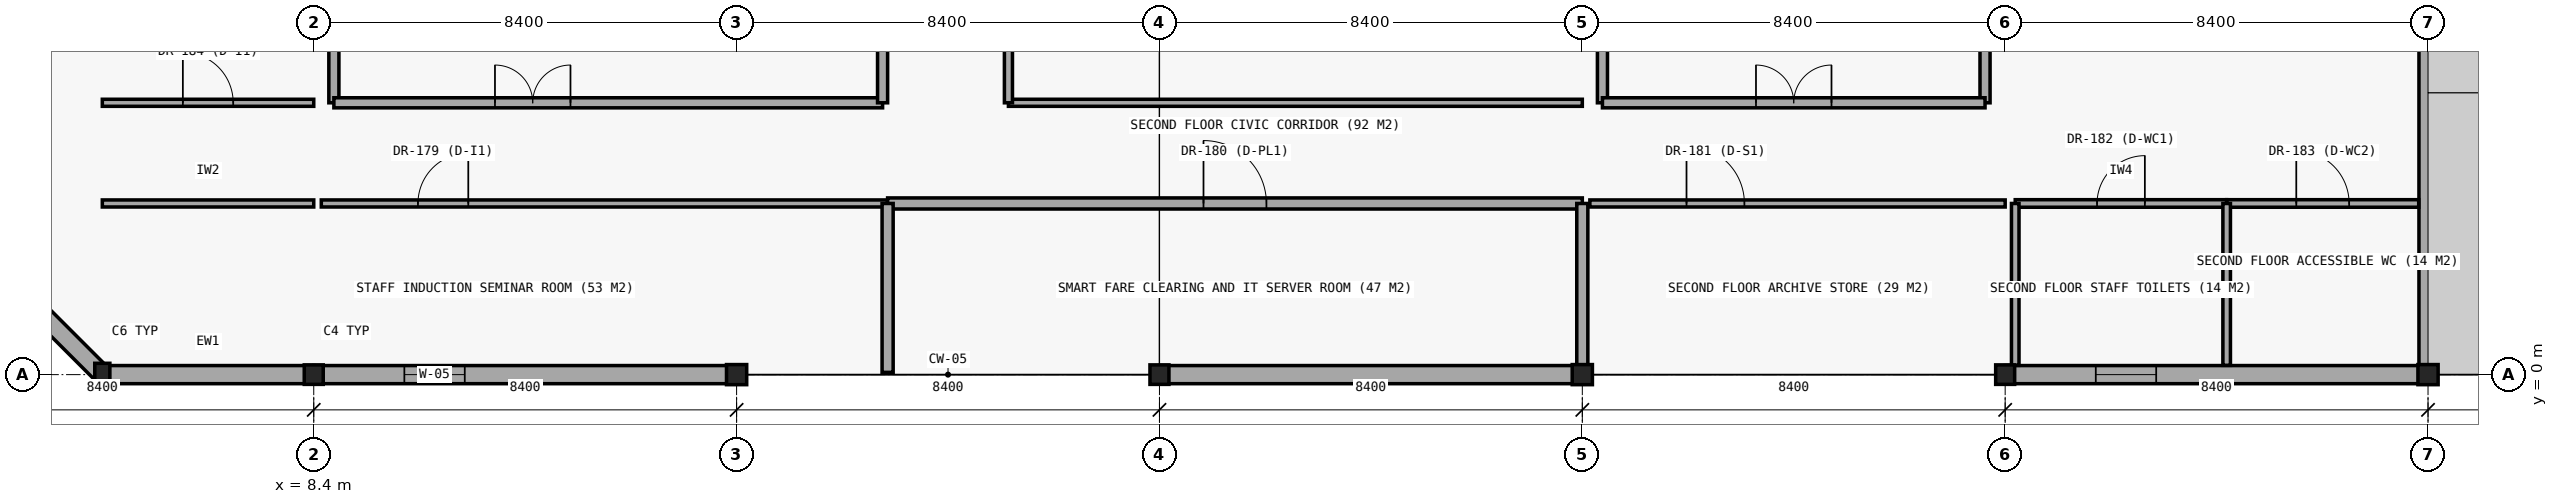
"""IFC4 building model, lengths in metres.
Left out: names, types, materials, properties, quantities, classifications, styles, units other than length and angle.
Written with IfcOpenShell. Run it as: python <this file> out.ifc"""

import sys

from ifc_helpers import new_model, si_unit, direction, frame, frame_2d, origin, origin_2d, place, context, subcontext, project, spatial, rectangle, i_section, extrude, element, fill, save


model = new_model("IFC4")
c1 = context("Model", 3, precision=1e-05, world=origin(), true_north=direction((0.0, 1.0)))
c2 = subcontext(c1, "Body", "Model", "MODEL_VIEW")
j1 = project(units=[si_unit("LENGTHUNIT", "METRE"), si_unit("PLANEANGLEUNIT", "RADIAN")], contexts=[c1])
p1 = place(None, origin())
s1 = spatial("IfcSite", under=j1, at=p1, CompositionType="ELEMENT")
p2 = place(p1, origin())
s2 = spatial("IfcBuilding", under=s1, at=p2, CompositionType="ELEMENT")
p3 = place(p2, frame((0.0, 0.0, 9.0)))
s3 = spatial("IfcBuildingStorey", under=s2, at=p3, CompositionType="ELEMENT", Elevation=9.0)
p4 = place(p3, frame((8.4, 0.0, 0.0), z_axis=(0.0, 0.0, 1.0), x_axis=(1.0, 0.0, 0.0)))
e1 = element("IfcColumn", 1, at=p4, inside=s3, PredefinedType="COLUMN", context=c2, shape_type="SweptSolid", body=[
    extrude(i_section(OverallWidth=0.377, OverallDepth=0.387, WebThickness=0.022, FlangeThickness=0.036, FilletRadius=0.015, at=origin_2d()), origin(), (0.0, 0.0, 1.0), 4.2),
])
p5 = place(p3, frame((16.8, 0.0, 0.0), z_axis=(0.0, 0.0, 1.0), x_axis=(1.0, 0.0, 0.0)))
e2 = element("IfcColumn", 2, at=p5, inside=s3, PredefinedType="COLUMN", context=c2, shape_type="SweptSolid", body=[
    extrude(i_section(OverallWidth=0.401, OverallDepth=0.399, WebThickness=0.025, FlangeThickness=0.04, FilletRadius=0.015, at=origin_2d()), origin(), (0.0, 0.0, 1.0), 4.2),
])
p6 = place(p3, frame((25.2, 0.0, 0.0), z_axis=(0.0, 0.0, 1.0), x_axis=(1.0, 0.0, 0.0)))
e3 = element("IfcColumn", 3, at=p6, inside=s3, PredefinedType="COLUMN", context=c2, shape_type="SweptSolid", body=[
    extrude(i_section(OverallWidth=0.377, OverallDepth=0.387, WebThickness=0.022, FlangeThickness=0.036, FilletRadius=0.015, at=origin_2d()), origin(), (0.0, 0.0, 1.0), 4.2),
])
p7 = place(p3, frame((33.6, 0.0, 0.0), z_axis=(0.0, 0.0, 1.0), x_axis=(1.0, 0.0, 0.0)))
e4 = element("IfcColumn", 4, at=p7, inside=s3, PredefinedType="COLUMN", context=c2, shape_type="SweptSolid", body=[
    extrude(i_section(OverallWidth=0.401, OverallDepth=0.399, WebThickness=0.025, FlangeThickness=0.04, FilletRadius=0.015, at=origin_2d()), origin(), (0.0, 0.0, 1.0), 4.2),
])
p8 = place(p3, frame((42.0, 0.0, 0.0), z_axis=(0.0, 0.0, 1.0), x_axis=(1.0, 0.0, 0.0)))
e5 = element("IfcColumn", 5, at=p8, inside=s3, PredefinedType="COLUMN", context=c2, shape_type="SweptSolid", body=[
    extrude(i_section(OverallWidth=0.377, OverallDepth=0.387, WebThickness=0.022, FlangeThickness=0.036, FilletRadius=0.015, at=origin_2d()), origin(), (0.0, 0.0, 1.0), 4.2),
])
p9 = place(p3, frame((50.4, 0.0, 0.0), z_axis=(0.0, 0.0, 1.0), x_axis=(1.0, 0.0, 0.0)))
e6 = element("IfcColumn", 6, at=p9, inside=s3, PredefinedType="COLUMN", context=c2, shape_type="SweptSolid", body=[
    extrude(i_section(OverallWidth=0.401, OverallDepth=0.399, WebThickness=0.025, FlangeThickness=0.04, FilletRadius=0.015, at=origin_2d()), origin(), (0.0, 0.0, 1.0), 4.2),
])
p10 = place(p3, frame((4.2, 0.0, 0.0), z_axis=(0.0, 0.0, 1.0), x_axis=(1.0, 0.0, 0.0)))
e7 = element("IfcColumn", 7, at=p10, inside=s3, PredefinedType="COLUMN", context=c2, shape_type="SweptSolid", body=[
    extrude(i_section(OverallWidth=0.3, OverallDepth=0.45, WebThickness=0.014, FlangeThickness=0.026, FilletRadius=0.027, at=origin_2d()), origin(), (0.0, 0.0, 1.0), 4.2),
])
p11 = place(p3, frame((4.2, 0.0, 0.0), z_axis=(0.0, 0.0, 1.0), x_axis=(1.0, 0.0, 0.0)))
e8 = element("IfcWall", 8, at=p11, inside=s3, PredefinedType="STANDARD", context=c2, shape_type="SweptSolid", body=[
    extrude(rectangle(XDim=4.2, YDim=0.36, at=frame_2d((2.1, 0.0))), origin(), (0.0, 0.0, 1.0), 3.62),
])
p12 = place(p3, frame((8.4, 0.0, 0.0), z_axis=(0.0, 0.0, 1.0), x_axis=(1.0, 0.0, 0.0)))
e9 = element("IfcWall", 9, at=p12, inside=s3, PredefinedType="STANDARD", context=c2, shape_type="SweptSolid", body=[
    extrude(rectangle(XDim=8.4, YDim=0.36, at=frame_2d((4.2, 0.0))), origin(), (0.0, 0.0, 1.0), 3.62),
])
p13 = place(p12, frame((1.8, 0.0, 0.85)))
e10 = element("IfcOpeningElement", 10, at=p13, cuts=e9, PredefinedType="OPENING", context=c2, shape_type="SweptSolid", body=[
    extrude(rectangle(XDim=1.2, YDim=2.4, at=frame_2d((0.6, 1.2))), frame((0.0, 0.19, 0.0), z_axis=(0.0, -1.0, 0.0), x_axis=(1.0, 0.0, 0.0)), (0.0, 0.0, 1.0), 0.38),
])
p14 = place(p3, frame((25.2, 0.0, 0.0), z_axis=(0.0, 0.0, 1.0), x_axis=(1.0, 0.0, 0.0)))
e11 = element("IfcWall", 11, at=p14, inside=s3, PredefinedType="STANDARD", context=c2, shape_type="SweptSolid", body=[
    extrude(rectangle(XDim=8.4, YDim=0.36, at=frame_2d((4.2, 0.0))), origin(), (0.0, 0.0, 1.0), 3.62),
])
p15 = place(p3, frame((42.0, 0.0, 0.0), z_axis=(0.0, 0.0, 1.0), x_axis=(1.0, 0.0, 0.0)))
e12 = element("IfcWall", 12, at=p15, inside=s3, PredefinedType="STANDARD", context=c2, shape_type="SweptSolid", body=[
    extrude(rectangle(XDim=8.4, YDim=0.36, at=frame_2d((4.2, 0.0))), origin(), (0.0, 0.0, 1.0), 3.62),
])
p16 = place(p15, frame((1.8, 0.0, 0.85)))
e13 = element("IfcOpeningElement", 13, at=p16, cuts=e12, PredefinedType="OPENING", context=c2, shape_type="SweptSolid", body=[
    extrude(rectangle(XDim=1.2, YDim=2.4, at=frame_2d((0.6, 1.2))), frame((0.0, 0.19, 0.0), z_axis=(0.0, -1.0, 0.0), x_axis=(1.0, 0.0, 0.0)), (0.0, 0.0, 1.0), 0.38),
])
p17 = place(p3, frame((50.4, 0.0, 0.0), z_axis=(0.0, 0.0, 1.0), x_axis=(0.0, 1.0, 0.0)))
e14 = element("IfcWall", 14, at=p17, inside=s3, PredefinedType="STANDARD", context=c2, shape_type="SweptSolid", body=[
    extrude(rectangle(XDim=8.4, YDim=0.36, at=frame_2d((4.2, 0.0))), origin(), (0.0, 0.0, 1.0), 3.62),
])
p18 = place(p3, frame((0.0, 4.2, 0.0), z_axis=(0.0, 0.0, 1.0), x_axis=(0.707106781187, -0.707106781187, 0.0)))
e15 = element("IfcWall", 15, at=p18, inside=s3, PredefinedType="STANDARD", context=c2, shape_type="SweptSolid", body=[
    extrude(rectangle(XDim=5.94, YDim=0.36, at=frame_2d((2.97, 0.0))), origin(), (0.0, 0.0, 1.0), 3.62),
])
p19 = place(p18, frame((2.5, 0.0, 1.0)))
e16 = element("IfcOpeningElement", 16, at=p19, cuts=e15, PredefinedType="OPENING", context=c2, shape_type="SweptSolid", body=[
    extrude(rectangle(XDim=0.85, YDim=1.8, at=frame_2d((0.425, 0.9))), frame((0.0, 0.19, 0.0), z_axis=(0.0, -1.0, 0.0), x_axis=(1.0, 0.0, 0.0)), (0.0, 0.0, 1.0), 0.38),
])
p20 = place(p3, frame((8.8, 5.4, 0.0), z_axis=(0.0, 0.0, 1.0), x_axis=(0.0, 1.0, 0.0)))
e17 = element("IfcWall", 17, at=p20, inside=s3, PredefinedType="PARTITIONING", context=c2, shape_type="SweptSolid", body=[
    extrude(rectangle(XDim=2.85, YDim=0.2, at=frame_2d((1.425, 0.0))), origin(), (0.0, 0.0, 1.0), 3.52),
])
p21 = place(p3, frame((8.8, 5.4, 0.0), z_axis=(0.0, 0.0, 1.0), x_axis=(1.0, 0.0, 0.0)))
e18 = element("IfcWall", 18, at=p21, inside=s3, PredefinedType="PARTITIONING", context=c2, shape_type="SweptSolid", body=[
    extrude(rectangle(XDim=10.9, YDim=0.2, at=frame_2d((5.45, 0.0))), origin(), (0.0, 0.0, 1.0), 3.52),
])
p22 = place(p21, frame((3.2, 0.0, 0.0)))
e19 = element("IfcOpeningElement", 19, at=p22, cuts=e18, PredefinedType="OPENING", context=c2, shape_type="SweptSolid", body=[
    extrude(rectangle(XDim=1.5, YDim=2.2, at=frame_2d((0.75, 1.1))), frame((0.0, 0.11, 0.0), z_axis=(0.0, -1.0, 0.0), x_axis=(1.0, 0.0, 0.0)), (0.0, 0.0, 1.0), 0.22),
])
p23 = place(p3, frame((19.7, 5.4, 0.0), z_axis=(0.0, 0.0, 1.0), x_axis=(0.0, 1.0, 0.0)))
e20 = element("IfcWall", 20, at=p23, inside=s3, PredefinedType="PARTITIONING", context=c2, shape_type="SweptSolid", body=[
    extrude(rectangle(XDim=9.6, YDim=0.2, at=frame_2d((4.8, 0.0))), origin(), (0.0, 0.0, 1.0), 3.52),
])
for number, where, z_axis, x_axis in (
    (21, (34.0, 5.4, 0.0), (0.0, 0.0, 1.0), (0.0, 1.0, 0.0)),
    (22, (41.6, 5.4, 0.0), (0.0, 0.0, 1.0), (0.0, 1.0, 0.0)),
):
    element("IfcWall", number, at=place(p3, frame(where, z_axis=z_axis, x_axis=x_axis)), inside=s3, PredefinedType="PARTITIONING", context=c2, shape_type="SweptSolid", body=[
        extrude(rectangle(XDim=2.85, YDim=0.2, at=frame_2d((1.425, 0.0))), origin(), (0.0, 0.0, 1.0), 3.49),
    ])
p24 = place(p3, frame((34.0, 5.4, 0.0), z_axis=(0.0, 0.0, 1.0), x_axis=(1.0, 0.0, 0.0)))
e23 = element("IfcWall", 23, at=p24, inside=s3, PredefinedType="PARTITIONING", context=c2, shape_type="SweptSolid", body=[
    extrude(rectangle(XDim=7.6, YDim=0.2, at=frame_2d((3.8, 0.0))), origin(), (0.0, 0.0, 1.0), 3.52),
])
p25 = place(p24, frame((3.05, 0.0, 0.0)))
e24 = element("IfcOpeningElement", 24, at=p25, cuts=e23, PredefinedType="OPENING", context=c2, shape_type="SweptSolid", body=[
    extrude(rectangle(XDim=1.5, YDim=2.2, at=frame_2d((0.75, 1.1))), frame((0.0, 0.11, 0.0), z_axis=(0.0, -1.0, 0.0), x_axis=(1.0, 0.0, 0.0)), (0.0, 0.0, 1.0), 0.22),
])
p26 = place(p3, frame((4.2, 3.4, 0.0), z_axis=(0.0, 0.0, 1.0), x_axis=(1.0, 0.0, 0.0)))
e25 = element("IfcWall", 25, at=p26, inside=s3, PredefinedType="PARTITIONING", context=c2, shape_type="SweptSolid", body=[
    extrude(rectangle(XDim=4.2, YDim=0.14, at=frame_2d((2.1, 0.0))), origin(), (0.0, 0.0, 1.0), 3.5),
])
p27 = place(p3, frame((8.55, 3.4, 0.0), z_axis=(0.0, 0.0, 1.0), x_axis=(1.0, 0.0, 0.0)))
e26 = element("IfcWall", 26, at=p27, inside=s3, PredefinedType="PARTITIONING", context=c2, shape_type="SweptSolid", body=[
    extrude(rectangle(XDim=11.25, YDim=0.14, at=frame_2d((5.625, 0.0))), origin(), (0.0, 0.0, 1.0), 3.5),
])
p28 = place(p27, frame((1.92, 0.0, 0.0)))
e27 = element("IfcOpeningElement", 27, at=p28, cuts=e26, PredefinedType="OPENING", context=c2, shape_type="SweptSolid", body=[
    extrude(rectangle(XDim=1.0, YDim=2.15, at=frame_2d((0.5, 1.075))), frame((0.0, 0.08, 0.0), z_axis=(0.0, -1.0, 0.0), x_axis=(1.0, 0.0, 0.0)), (0.0, 0.0, 1.0), 0.16),
])
p29 = place(p3, frame((19.8, 3.4, 0.0), z_axis=(0.0, 0.0, 1.0), x_axis=(1.0, 0.0, 0.0)))
e28 = element("IfcWall", 28, at=p29, inside=s3, PredefinedType="PARTITIONING", context=c2, shape_type="SweptSolid", body=[
    extrude(rectangle(XDim=13.8, YDim=0.22, at=frame_2d((6.9, 0.0))), origin(), (0.0, 0.0, 1.0), 3.5),
])
p30 = place(p29, frame((6.275, 0.0, 0.0)))
e29 = element("IfcOpeningElement", 29, at=p30, cuts=e28, PredefinedType="OPENING", context=c2, shape_type="SweptSolid", body=[
    extrude(rectangle(XDim=1.25, YDim=2.2, at=frame_2d((0.625, 1.1))), frame((0.0, 0.12, 0.0), z_axis=(0.0, -1.0, 0.0), x_axis=(1.0, 0.0, 0.0)), (0.0, 0.0, 1.0), 0.24),
])
p31 = place(p3, frame((33.75, 3.4, 0.0), z_axis=(0.0, 0.0, 1.0), x_axis=(1.0, 0.0, 0.0)))
e30 = element("IfcWall", 30, at=p31, inside=s3, PredefinedType="PARTITIONING", context=c2, shape_type="SweptSolid", body=[
    extrude(rectangle(XDim=8.25, YDim=0.14, at=frame_2d((4.125, 0.0))), origin(), (0.0, 0.0, 1.0), 3.5),
])
p32 = place(p31, frame((1.92, 0.0, 0.0)))
e31 = element("IfcOpeningElement", 31, at=p32, cuts=e30, PredefinedType="OPENING", context=c2, shape_type="SweptSolid", body=[
    extrude(rectangle(XDim=1.15, YDim=2.15, at=frame_2d((0.575, 1.075))), frame((0.0, 0.08, 0.0), z_axis=(0.0, -1.0, 0.0), x_axis=(1.0, 0.0, 0.0)), (0.0, 0.0, 1.0), 0.16),
])
p33 = place(p3, frame((42.2, 3.4, 0.0), z_axis=(0.0, 0.0, 1.0), x_axis=(1.0, 0.0, 0.0)))
e32 = element("IfcWall", 32, at=p33, inside=s3, PredefinedType="PARTITIONING", context=c2, shape_type="SweptSolid", body=[
    extrude(rectangle(XDim=4.2, YDim=0.15, at=frame_2d((2.1, 0.0))), origin(), (0.0, 0.0, 1.0), 3.5),
])
p34 = place(p33, frame((1.625, 0.0, 0.0)))
e33 = element("IfcOpeningElement", 33, at=p34, cuts=e32, PredefinedType="OPENING", context=c2, shape_type="SweptSolid", body=[
    extrude(rectangle(XDim=0.95, YDim=2.1, at=frame_2d((0.475, 1.05))), frame((0.0, 0.085, 0.0), z_axis=(0.0, -1.0, 0.0), x_axis=(1.0, 0.0, 0.0)), (0.0, 0.0, 1.0), 0.17),
])
p35 = place(p3, frame((46.4, 3.4, 0.0), z_axis=(0.0, 0.0, 1.0), x_axis=(1.0, 0.0, 0.0)))
e34 = element("IfcWall", 34, at=p35, inside=s3, PredefinedType="PARTITIONING", context=c2, shape_type="SweptSolid", body=[
    extrude(rectangle(XDim=3.815, YDim=0.15, at=frame_2d((1.908, 0.0))), origin(), (0.0, 0.0, 1.0), 3.5),
])
p36 = place(p35, frame((1.383, 0.0, 0.0)))
e35 = element("IfcOpeningElement", 35, at=p36, cuts=e34, PredefinedType="OPENING", context=c2, shape_type="SweptSolid", body=[
    extrude(rectangle(XDim=1.05, YDim=2.15, at=frame_2d((0.525, 1.075))), frame((0.0, 0.085, 0.0), z_axis=(0.0, -1.0, 0.0), x_axis=(1.0, 0.0, 0.0)), (0.0, 0.0, 1.0), 0.17),
])
p37 = place(p3, frame((4.2, 5.4, 0.0), z_axis=(0.0, 0.0, 1.0), x_axis=(1.0, 0.0, 0.0)))
e36 = element("IfcWall", 36, at=p37, inside=s3, PredefinedType="PARTITIONING", context=c2, shape_type="SweptSolid", body=[
    extrude(rectangle(XDim=4.2, YDim=0.14, at=frame_2d((2.1, 0.0))), origin(), (0.0, 0.0, 1.0), 3.5),
])
p38 = place(p37, frame((1.6, 0.0, 0.0)))
e37 = element("IfcOpeningElement", 37, at=p38, cuts=e36, PredefinedType="OPENING", context=c2, shape_type="SweptSolid", body=[
    extrude(rectangle(XDim=1.0, YDim=2.15, at=frame_2d((0.5, 1.075))), frame((0.0, 0.08, 0.0), z_axis=(0.0, -1.0, 0.0), x_axis=(1.0, 0.0, 0.0)), (0.0, 0.0, 1.0), 0.16),
])
p39 = place(p3, frame((22.2, 5.4, 0.0), z_axis=(0.0, 0.0, 1.0), x_axis=(1.0, 0.0, 0.0)))
e38 = element("IfcWall", 38, at=p39, inside=s3, PredefinedType="PARTITIONING", context=c2, shape_type="SweptSolid", body=[
    extrude(rectangle(XDim=11.4, YDim=0.14, at=frame_2d((5.7, 0.0))), origin(), (0.0, 0.0, 1.0), 3.5),
])
p40 = place(p3, frame((19.8, 0.045, 0.0), z_axis=(0.0, 0.0, 1.0), x_axis=(0.0, 1.0, 0.0)))
e39 = element("IfcWall", 39, at=p40, inside=s3, PredefinedType="PARTITIONING", context=c2, shape_type="SweptSolid", body=[
    extrude(rectangle(XDim=3.355, YDim=0.22, at=frame_2d((1.677, 0.0))), origin(), (0.0, 0.0, 1.0), 3.5),
])
p41 = place(p3, frame((22.2, 5.4, 0.0), z_axis=(0.0, 0.0, 1.0), x_axis=(0.0, 1.0, 0.0)))
e40 = element("IfcWall", 40, at=p41, inside=s3, PredefinedType="PARTITIONING", context=c2, shape_type="SweptSolid", body=[
    extrude(rectangle(XDim=16.6, YDim=0.16, at=frame_2d((8.3, 0.0))), origin(), (0.0, 0.0, 1.0), 3.5),
])
p42 = place(p41, frame((13.12, 0.0, 0.0)))
e41 = element("IfcOpeningElement", 41, at=p42, cuts=e40, PredefinedType="OPENING", context=c2, shape_type="SweptSolid", body=[
    extrude(rectangle(XDim=1.0, YDim=2.15, at=frame_2d((0.5, 1.075))), frame((0.0, 0.09, 0.0), z_axis=(0.0, -1.0, 0.0), x_axis=(1.0, 0.0, 0.0)), (0.0, 0.0, 1.0), 0.18),
])
p43 = place(p3, frame((33.6, 0.185, 0.0), z_axis=(0.0, 0.0, 1.0), x_axis=(0.0, 1.0, 0.0)))
e42 = element("IfcWall", 42, at=p43, inside=s3, PredefinedType="PARTITIONING", context=c2, shape_type="SweptSolid", body=[
    extrude(rectangle(XDim=3.215, YDim=0.22, at=frame_2d((1.607, 0.0))), origin(), (0.0, 0.0, 1.0), 3.49),
])
p44 = place(p3, frame((42.2, 0.185, 0.0), z_axis=(0.0, 0.0, 1.0), x_axis=(0.0, 1.0, 0.0)))
e43 = element("IfcWall", 43, at=p44, inside=s3, PredefinedType="PARTITIONING", context=c2, shape_type="SweptSolid", body=[
    extrude(rectangle(XDim=3.215, YDim=0.15, at=frame_2d((1.607, 0.0))), origin(), (0.0, 0.0, 1.0), 3.49),
])
p45 = place(p3, frame((46.4, 0.185, 0.0), z_axis=(0.0, 0.0, 1.0), x_axis=(0.0, 1.0, 0.0)))
e44 = element("IfcWall", 44, at=p45, inside=s3, PredefinedType="PARTITIONING", context=c2, shape_type="SweptSolid", body=[
    extrude(rectangle(XDim=3.215, YDim=0.15, at=frame_2d((1.607, 0.0))), origin(), (0.0, 0.0, 1.0), 3.5),
])
p46 = place(p13, origin())
e45 = element("IfcWindow", 45, at=p46, inside=s3, PartitioningType="SINGLE_PANEL", PredefinedType="WINDOW", context=c2, shape_type="SweptSolid", body=[
    extrude(rectangle(XDim=1.2, YDim=2.4, at=frame_2d((0.6, 1.2))), frame((0.0, 0.03, 0.0), z_axis=(0.0, -1.0, 0.0), x_axis=(1.0, 0.0, 0.0)), (0.0, 0.0, 1.0), 0.06),
])
fill(e10, e45)
p47 = place(p16, origin())
e46 = element("IfcWindow", 46, at=p47, inside=s3, PartitioningType="SINGLE_PANEL", PredefinedType="WINDOW", context=c2, shape_type="SweptSolid", body=[
    extrude(rectangle(XDim=1.2, YDim=2.4, at=frame_2d((0.6, 1.2))), frame((0.0, 0.03, 0.0), z_axis=(0.0, -1.0, 0.0), x_axis=(1.0, 0.0, 0.0)), (0.0, 0.0, 1.0), 0.06),
])
fill(e13, e46)
p48 = place(p22, origin())
e47 = element("IfcDoor", 47, at=p48, inside=s3, OperationType="DOUBLE_DOOR_SINGLE_SWING", PredefinedType="DOOR", context=c2, shape_type="SweptSolid", body=[
    extrude(rectangle(XDim=1.5, YDim=2.2, at=frame_2d((0.75, 1.1))), frame((0.0, 0.025, 0.0), z_axis=(0.0, -1.0, 0.0), x_axis=(1.0, 0.0, 0.0)), (0.0, 0.0, 1.0), 0.05),
])
fill(e19, e47)
p49 = place(p25, origin())
e48 = element("IfcDoor", 48, at=p49, inside=s3, OperationType="DOUBLE_DOOR_SINGLE_SWING", PredefinedType="DOOR", context=c2, shape_type="SweptSolid", body=[
    extrude(rectangle(XDim=1.5, YDim=2.2, at=frame_2d((0.75, 1.1))), frame((0.0, 0.025, 0.0), z_axis=(0.0, -1.0, 0.0), x_axis=(1.0, 0.0, 0.0)), (0.0, 0.0, 1.0), 0.05),
])
fill(e24, e48)
p50 = place(p28, origin())
e49 = element("IfcDoor", 49, at=p50, inside=s3, OperationType="SINGLE_SWING_RIGHT", PredefinedType="DOOR", context=c2, shape_type="SweptSolid", body=[
    extrude(rectangle(XDim=1.0, YDim=2.15, at=frame_2d((0.5, 1.075))), frame((0.0, 0.025, 0.0), z_axis=(0.0, -1.0, 0.0), x_axis=(1.0, 0.0, 0.0)), (0.0, 0.0, 1.0), 0.05),
])
fill(e27, e49)
p51 = place(p30, origin())
e50 = element("IfcDoor", 50, at=p51, inside=s3, OperationType="SINGLE_SWING_LEFT", PredefinedType="DOOR", context=c2, shape_type="SweptSolid", body=[
    extrude(rectangle(XDim=1.25, YDim=2.2, at=frame_2d((0.625, 1.1))), frame((0.0, 0.025, 0.0), z_axis=(0.0, -1.0, 0.0), x_axis=(1.0, 0.0, 0.0)), (0.0, 0.0, 1.0), 0.05),
])
fill(e29, e50)
p52 = place(p32, origin())
e51 = element("IfcDoor", 51, at=p52, inside=s3, OperationType="SINGLE_SWING_LEFT", PredefinedType="DOOR", context=c2, shape_type="SweptSolid", body=[
    extrude(rectangle(XDim=1.15, YDim=2.15, at=frame_2d((0.575, 1.075))), frame((0.0, 0.025, 0.0), z_axis=(0.0, -1.0, 0.0), x_axis=(1.0, 0.0, 0.0)), (0.0, 0.0, 1.0), 0.05),
])
fill(e31, e51)
p53 = place(p34, origin())
e52 = element("IfcDoor", 52, at=p53, inside=s3, OperationType="SINGLE_SWING_RIGHT", PredefinedType="DOOR", context=c2, shape_type="SweptSolid", body=[
    extrude(rectangle(XDim=0.95, YDim=2.1, at=frame_2d((0.475, 1.05))), frame((0.0, 0.025, 0.0), z_axis=(0.0, -1.0, 0.0), x_axis=(1.0, 0.0, 0.0)), (0.0, 0.0, 1.0), 0.05),
])
fill(e33, e52)
p54 = place(p36, origin())
e53 = element("IfcDoor", 53, at=p54, inside=s3, OperationType="SINGLE_SWING_LEFT", PredefinedType="DOOR", context=c2, shape_type="SweptSolid", body=[
    extrude(rectangle(XDim=1.05, YDim=2.15, at=frame_2d((0.525, 1.075))), frame((0.0, 0.025, 0.0), z_axis=(0.0, -1.0, 0.0), x_axis=(1.0, 0.0, 0.0)), (0.0, 0.0, 1.0), 0.05),
])
fill(e35, e53)
p55 = place(p38, origin())
e54 = element("IfcDoor", 54, at=p55, inside=s3, OperationType="SINGLE_SWING_LEFT", PredefinedType="DOOR", context=c2, shape_type="SweptSolid", body=[
    extrude(rectangle(XDim=1.0, YDim=2.15, at=frame_2d((0.5, 1.075))), frame((0.0, 0.025, 0.0), z_axis=(0.0, -1.0, 0.0), x_axis=(1.0, 0.0, 0.0)), (0.0, 0.0, 1.0), 0.05),
])
fill(e37, e54)
save(model, sys.argv[1])
